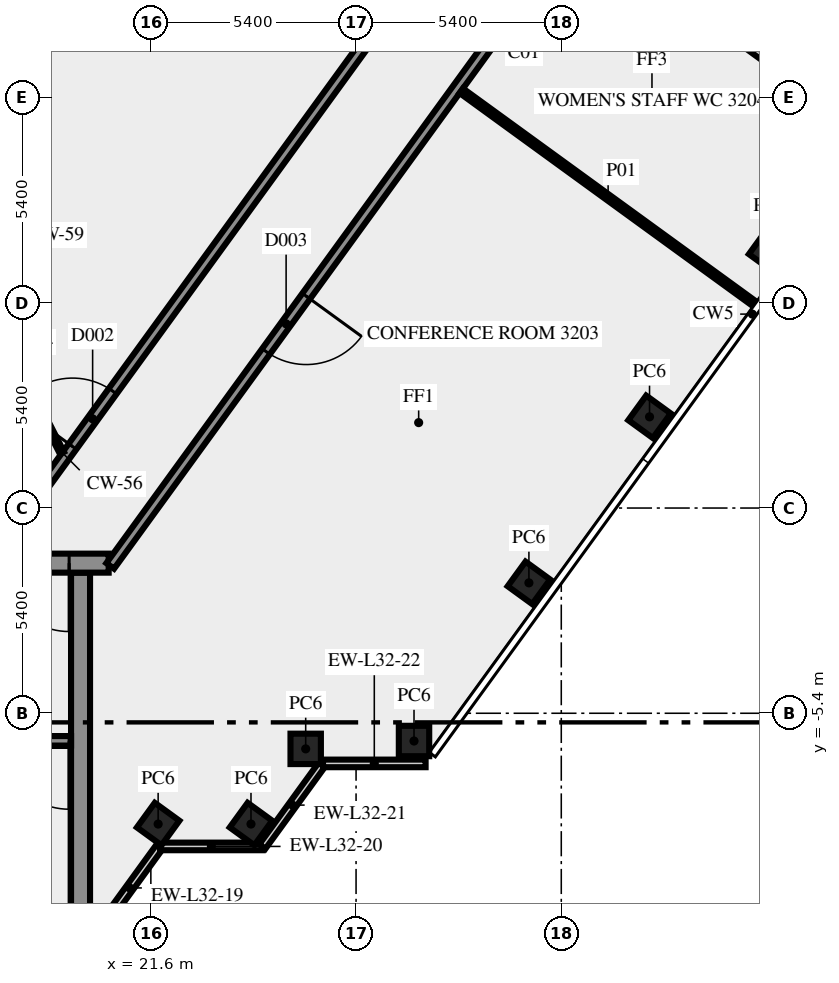
"""IFC4 building model, lengths in metres.
Left out: names, types, materials, properties, quantities, classifications, styles, units other than length and angle.
Written with IfcOpenShell. Run it as: python <this file> out.ifc"""

import sys

from ifc_helpers import new_model, si_unit, direction, frame, frame_2d, origin, origin_2d, place, context, subcontext, project, spatial, rectangle, extrude, element, fill, save


model = new_model("IFC4")
c1 = context("Model", 3, precision=1e-05, world=origin(), true_north=direction((0.0, 1.0)))
c2 = subcontext(c1, "Body", "Model", "MODEL_VIEW")
j1 = project(units=[si_unit("LENGTHUNIT", "METRE"), si_unit("PLANEANGLEUNIT", "RADIAN")], contexts=[c1])
p1 = place(None, origin())
s1 = spatial("IfcSite", under=j1, at=p1, CompositionType="ELEMENT")
p2 = place(p1, origin())
s2 = spatial("IfcBuilding", under=s1, at=p2, CompositionType="ELEMENT")
p3 = place(p2, frame((0.0, 0.0, 139.0)))
s3 = spatial("IfcBuildingStorey", under=s2, at=p3, CompositionType="ELEMENT", Elevation=139.0)
for number, where, z_axis, x_axis in (
    (1, (21.792, -8.315, 0.0), (0.0, 0.0, 1.0), (0.588, 0.809, 0.0)),
    (2, (24.235, -8.315, 0.0), (0.0, 0.0, 1.0), (0.588, 0.809, 0.0)),
    (3, (25.674, -6.337, 0.0), (0.0, 0.0, 1.0), (1.0, 0.0, 0.0)),
    (4, (28.525, -6.13, 0.0), (0.0, 0.0, 1.0), (1.0, 0.0, 0.0)),
    (5, (31.548, -1.969, 0.0), (0.0, 0.0, 1.0), (0.588, 0.809, 0.0)),
    (6, (34.722, 2.4, 0.0), (0.0, 0.0, 1.0), (0.588, 0.809, 0.0)),
    (7, (37.896, 6.769, 0.0), (0.0, 0.0, 1.0), (0.588, 0.809, 0.0)),
):
    element("IfcColumn", number, at=place(p3, frame(where, z_axis=z_axis, x_axis=x_axis)), inside=s3, PredefinedType="COLUMN", context=c2, shape_type="SweptSolid", body=[
        extrude(rectangle(XDim=0.8, YDim=0.8, at=origin_2d()), origin(), (0.0, 0.0, 1.0), 4.65),
    ])
p4 = place(p3, frame((20.253, -11.083, 0.0), z_axis=(0.0, 0.0, 1.0), x_axis=(0.587766567315, 0.809030569476, 0.0)))
e8 = element("IfcWall", 8, at=p4, inside=s3, PredefinedType="SOLIDWALL", context=c2, shape_type="SweptSolid", body=[
    extrude(rectangle(XDim=2.688, YDim=0.2, at=frame_2d((1.344, 0.0))), origin(), (0.0, 0.0, 1.0), 4.65),
])
p5 = place(p3, frame((21.843, -8.904, 0.0), z_axis=(0.0, 0.0, 1.0), x_axis=(1.0, 0.0, 0.0)))
e9 = element("IfcWall", 9, at=p5, inside=s3, PredefinedType="SOLIDWALL", context=c2, shape_type="SweptSolid", body=[
    extrude(rectangle(XDim=2.7, YDim=0.2, at=frame_2d((1.35, 0.0))), origin(), (0.0, 0.0, 1.0), 4.65),
])
p6 = place(p3, frame((24.533, -8.909, 0.0), z_axis=(0.0, 0.0, 1.0), x_axis=(0.587720002413, 0.809064397168, 0.0)))
e10 = element("IfcWall", 10, at=p6, inside=s3, PredefinedType="SOLIDWALL", context=c2, shape_type="SweptSolid", body=[
    extrude(rectangle(XDim=2.7, YDim=0.2, at=frame_2d((1.35, 0.0))), origin(), (0.0, 0.0, 1.0), 4.65),
])
p7 = place(p3, frame((26.13, -6.719, 0.0), z_axis=(0.0, 0.0, 1.0), x_axis=(1.0, 0.0, 0.0)))
e11 = element("IfcWall", 11, at=p7, inside=s3, PredefinedType="SOLIDWALL", context=c2, shape_type="SweptSolid", body=[
    extrude(rectangle(XDim=2.7, YDim=0.2, at=frame_2d((1.35, 0.0))), origin(), (0.0, 0.0, 1.0), 4.65),
])
p8 = place(p3, frame((19.75, -10.5, 0.0), z_axis=(0.0, 0.0, 1.0), x_axis=(0.0, 1.0, 0.0)))
e12 = element("IfcWall", 12, at=p8, inside=s3, PredefinedType="SHEAR", context=c2, shape_type="SweptSolid", body=[
    extrude(rectangle(XDim=8.8, YDim=0.5, at=frame_2d((4.4, 0.0))), origin(), (0.0, 0.0, 1.0), 4.65),
])
p9 = place(p3, frame((19.5, -6.125, 0.0), z_axis=(0.0, 0.0, 1.0), x_axis=(-1.0, 0.0, 0.0)))
e13 = element("IfcWall", 13, at=p9, inside=s3, PredefinedType="SHEAR", context=c2, shape_type="SweptSolid", body=[
    extrude(rectangle(XDim=8.05, YDim=0.25, at=frame_2d((4.025, 0.0))), origin(), (0.0, 0.0, 1.0), 4.65),
])
p10 = place(p9, frame((0.05, 0.0, 0.0)))
e14 = element("IfcOpeningElement", 14, at=p10, cuts=e13, PredefinedType="OPENING", context=c2, shape_type="SweptSolid", body=[
    extrude(rectangle(XDim=1.8, YDim=2.1, at=frame_2d((0.9, 1.05))), frame((0.0, 0.135, 0.0), z_axis=(0.0, -1.0, 0.0), x_axis=(1.0, 0.0, 0.0)), (0.0, 0.0, 1.0), 0.27),
])
p11 = place(p3, frame((20.49, -1.45, 0.0), z_axis=(0.0, 0.0, 1.0), x_axis=(-1.0, 0.0, 0.0)))
e15 = element("IfcWall", 15, at=p11, inside=s3, PredefinedType="SHEAR", context=c2, shape_type="SweptSolid", body=[
    extrude(rectangle(XDim=40.98, YDim=0.5, at=frame_2d((20.49, 0.0))), origin(), (0.0, 0.0, 1.0), 4.65),
])
p12 = place(p11, frame((38.14, 0.0, 0.0)))
e16 = element("IfcOpeningElement", 16, at=p12, cuts=e15, PredefinedType="OPENING", context=c2, shape_type="SweptSolid", body=[
    extrude(rectangle(XDim=1.8, YDim=2.1, at=frame_2d((0.9, 1.05))), frame((0.0, 0.26, 0.0), z_axis=(0.0, -1.0, 0.0), x_axis=(1.0, 0.0, 0.0)), (0.0, 0.0, 1.0), 0.52),
])
p13 = place(p11, frame((35.89, 0.0, 0.0)))
e17 = element("IfcOpeningElement", 17, at=p13, cuts=e15, PredefinedType="OPENING", context=c2, shape_type="SweptSolid", body=[
    extrude(rectangle(XDim=0.9, YDim=2.1, at=frame_2d((0.45, 1.05))), frame((0.0, 0.26, 0.0), z_axis=(0.0, -1.0, 0.0), x_axis=(1.0, 0.0, 0.0)), (0.0, 0.0, 1.0), 0.52),
])
p14 = place(p11, frame((32.94, 0.0, 0.0)))
e18 = element("IfcOpeningElement", 18, at=p14, cuts=e15, PredefinedType="OPENING", context=c2, shape_type="SweptSolid", body=[
    extrude(rectangle(XDim=0.9, YDim=2.1, at=frame_2d((0.45, 1.05))), frame((0.0, 0.26, 0.0), z_axis=(0.0, -1.0, 0.0), x_axis=(1.0, 0.0, 0.0)), (0.0, 0.0, 1.0), 0.52),
])
p15 = place(p11, frame((21.765, 0.0, 0.0)))
e19 = element("IfcOpeningElement", 19, at=p15, cuts=e15, PredefinedType="OPENING", context=c2, shape_type="SweptSolid", body=[
    extrude(rectangle(XDim=2.0, YDim=2.1, at=frame_2d((1.0, 1.05))), frame((0.0, 0.26, 0.0), z_axis=(0.0, -1.0, 0.0), x_axis=(1.0, 0.0, 0.0)), (0.0, 0.0, 1.0), 0.52),
])
p16 = place(p11, frame((7.14, 0.0, 0.0)))
e20 = element("IfcOpeningElement", 20, at=p16, cuts=e15, PredefinedType="OPENING", context=c2, shape_type="SweptSolid", body=[
    extrude(rectangle(XDim=0.9, YDim=2.1, at=frame_2d((0.45, 1.05))), frame((0.0, 0.26, 0.0), z_axis=(0.0, -1.0, 0.0), x_axis=(1.0, 0.0, 0.0)), (0.0, 0.0, 1.0), 0.52),
])
p17 = place(p11, frame((5.028, 0.0, 0.0)))
e21 = element("IfcOpeningElement", 21, at=p17, cuts=e15, PredefinedType="OPENING", context=c2, shape_type="SweptSolid", body=[
    extrude(rectangle(XDim=0.8, YDim=2.1, at=frame_2d((0.4, 1.05))), frame((0.0, 0.26, 0.0), z_axis=(0.0, -1.0, 0.0), x_axis=(1.0, 0.0, 0.0)), (0.0, 0.0, 1.0), 0.52),
])
p18 = place(p11, frame((3.452, 0.0, 0.0)))
e22 = element("IfcOpeningElement", 22, at=p18, cuts=e15, PredefinedType="OPENING", context=c2, shape_type="SweptSolid", body=[
    extrude(rectangle(XDim=0.8, YDim=2.1, at=frame_2d((0.4, 1.05))), frame((0.0, 0.26, 0.0), z_axis=(0.0, -1.0, 0.0), x_axis=(1.0, 0.0, 0.0)), (0.0, 0.0, 1.0), 0.52),
])
p19 = place(p11, frame((1.04, 0.0, 0.0)))
e23 = element("IfcOpeningElement", 23, at=p19, cuts=e15, PredefinedType="OPENING", context=c2, shape_type="SweptSolid", body=[
    extrude(rectangle(XDim=1.8, YDim=2.1, at=frame_2d((0.9, 1.05))), frame((0.0, 0.26, 0.0), z_axis=(0.0, -1.0, 0.0), x_axis=(1.0, 0.0, 0.0)), (0.0, 0.0, 1.0), 0.52),
])
p20 = place(p3, frame((40.463, 25.911, 0.0), z_axis=(0.0, 0.0, 1.0), x_axis=(-0.587781654618, -0.809019608226, 0.0)))
e24 = element("IfcWall", 24, at=p20, inside=s3, PredefinedType="SOLIDWALL", context=c2, shape_type="SweptSolid", body=[
    extrude(rectangle(XDim=33.911, YDim=0.25, at=frame_2d((16.956, 0.0))), origin(), (0.0, 0.0, 1.0), 4.65),
])
p21 = place(p20, frame((25.137, 0.0, 0.0)))
e25 = element("IfcOpeningElement", 25, at=p21, cuts=e24, PredefinedType="OPENING", context=c2, shape_type="SweptSolid", body=[
    extrude(rectangle(XDim=1.8, YDim=2.1, at=frame_2d((0.9, 1.05))), frame((0.0, 0.135, 0.0), z_axis=(0.0, -1.0, 0.0), x_axis=(1.0, 0.0, 0.0)), (0.0, 0.0, 1.0), 0.27),
])
p22 = place(p20, frame((13.296, 0.0, 0.0)))
e26 = element("IfcOpeningElement", 26, at=p22, cuts=e24, PredefinedType="OPENING", context=c2, shape_type="SweptSolid", body=[
    extrude(rectangle(XDim=0.9, YDim=2.1, at=frame_2d((0.45, 1.05))), frame((0.0, 0.135, 0.0), z_axis=(0.0, -1.0, 0.0), x_axis=(1.0, 0.0, 0.0)), (0.0, 0.0, 1.0), 0.27),
])
p23 = place(p20, frame((0.441, 0.0, 0.0)))
e27 = element("IfcOpeningElement", 27, at=p23, cuts=e24, PredefinedType="OPENING", context=c2, shape_type="SweptSolid", body=[
    extrude(rectangle(XDim=0.9, YDim=2.1, at=frame_2d((0.45, 1.05))), frame((0.0, 0.135, 0.0), z_axis=(0.0, -1.0, 0.0), x_axis=(1.0, 0.0, 0.0)), (0.0, 0.0, 1.0), 0.27),
])
p24 = place(p3, frame((17.545, -1.125, 0.0), z_axis=(0.0, 0.0, 1.0), x_axis=(0.587788021768, 0.809014982226, 0.0)))
e28 = element("IfcWall", 28, at=p24, inside=s3, PredefinedType="SOLIDWALL", context=c2, shape_type="SweptSolid", body=[
    extrude(rectangle(XDim=35.344, YDim=0.25, at=frame_2d((17.672, 0.0))), origin(), (0.0, 0.0, 1.0), 4.65),
])
p25 = place(p24, frame((33.153, 0.0, 0.0)))
e29 = element("IfcOpeningElement", 29, at=p25, cuts=e28, PredefinedType="OPENING", context=c2, shape_type="SweptSolid", body=[
    extrude(rectangle(XDim=1.8, YDim=2.1, at=frame_2d((0.9, 1.05))), frame((0.0, 0.135, 0.0), z_axis=(0.0, -1.0, 0.0), x_axis=(1.0, 0.0, 0.0)), (0.0, 0.0, 1.0), 0.27),
])
p26 = place(p24, frame((3.392, 0.0, 0.0)))
e30 = element("IfcOpeningElement", 30, at=p26, cuts=e28, PredefinedType="OPENING", context=c2, shape_type="SweptSolid", body=[
    extrude(rectangle(XDim=1.8, YDim=2.1, at=frame_2d((0.9, 1.05))), frame((0.0, 0.135, 0.0), z_axis=(0.0, -1.0, 0.0), x_axis=(1.0, 0.0, 0.0)), (0.0, 0.0, 1.0), 0.27),
])
p27 = place(p3, frame((37.496, 5.367, 0.0), z_axis=(0.0, 0.0, 1.0), x_axis=(-0.809048817734, 0.587741448702, 0.0)))
e31 = element("IfcWall", 31, at=p27, inside=s3, PredefinedType="PARTITIONING", context=c2, shape_type="SweptSolid", body=[
    extrude(rectangle(XDim=9.55, YDim=0.15, at=frame_2d((4.775, 0.0))), origin(), (0.0, 0.0, 1.0), 3.85),
])
p28 = place(p3, frame((40.67, 9.735, 0.0), z_axis=(0.0, 0.0, 1.0), x_axis=(-0.809033337127, 0.587762757767, 0.0)))
e32 = element("IfcWall", 32, at=p28, inside=s3, PredefinedType="SOLIDWALL", context=c2, shape_type="SweptSolid", body=[
    extrude(rectangle(XDim=9.551, YDim=0.2, at=frame_2d((4.775, 0.0))), origin(), (0.0, 0.0, 1.0), 3.85),
])
p29 = place(p3, frame((18.0, 3.925, 0.0), z_axis=(0.0, 0.0, 1.0), x_axis=(0.453950796792, -0.891026752736, 0.0)))
e33 = element("IfcWall", 33, at=p29, inside=s3, PredefinedType="PARTITIONING", context=c2, shape_type="SweptSolid", body=[
    extrude(rectangle(XDim=2.778, YDim=0.12, at=frame_2d((1.389, 0.0))), origin(), (0.0, 0.0, 1.0), 4.65),
])
p30 = place(p10, origin())
e34 = element("IfcDoor", 34, at=p30, inside=s3, OperationType="DOUBLE_DOOR_SINGLE_SWING", PredefinedType="DOOR", context=c2, shape_type="SweptSolid", body=[
    extrude(rectangle(XDim=1.8, YDim=2.1, at=frame_2d((0.9, 1.05))), frame((0.0, 0.025, 0.0), z_axis=(0.0, -1.0, 0.0), x_axis=(1.0, 0.0, 0.0)), (0.0, 0.0, 1.0), 0.05),
])
fill(e14, e34)
p31 = place(p19, origin())
e35 = element("IfcDoor", 35, at=p31, inside=s3, OperationType="DOUBLE_DOOR_SINGLE_SWING", PredefinedType="DOOR", context=c2, shape_type="SweptSolid", body=[
    extrude(rectangle(XDim=1.8, YDim=2.1, at=frame_2d((0.9, 1.05))), frame((0.0, 0.025, 0.0), z_axis=(0.0, -1.0, 0.0), x_axis=(1.0, 0.0, 0.0)), (0.0, 0.0, 1.0), 0.05),
])
fill(e23, e35)
p32 = place(p26, origin())
e36 = element("IfcDoor", 36, at=p32, inside=s3, OperationType="DOUBLE_DOOR_SINGLE_SWING", PredefinedType="DOOR", context=c2, shape_type="SweptSolid", body=[
    extrude(rectangle(XDim=1.8, YDim=2.1, at=frame_2d((0.9, 1.05))), frame((0.0, 0.025, 0.0), z_axis=(0.0, -1.0, 0.0), x_axis=(1.0, 0.0, 0.0)), (0.0, 0.0, 1.0), 0.05),
])
fill(e30, e36)
p33 = place(p21, origin())
e37 = element("IfcDoor", 37, at=p33, inside=s3, OperationType="DOUBLE_DOOR_SINGLE_SWING", PredefinedType="DOOR", context=c2, shape_type="SweptSolid", body=[
    extrude(rectangle(XDim=1.8, YDim=2.1, at=frame_2d((0.9, 1.05))), frame((0.0, 0.025, 0.0), z_axis=(0.0, -1.0, 0.0), x_axis=(1.0, 0.0, 0.0)), (0.0, 0.0, 1.0), 0.05),
])
fill(e25, e37)
save(model, sys.argv[1])
